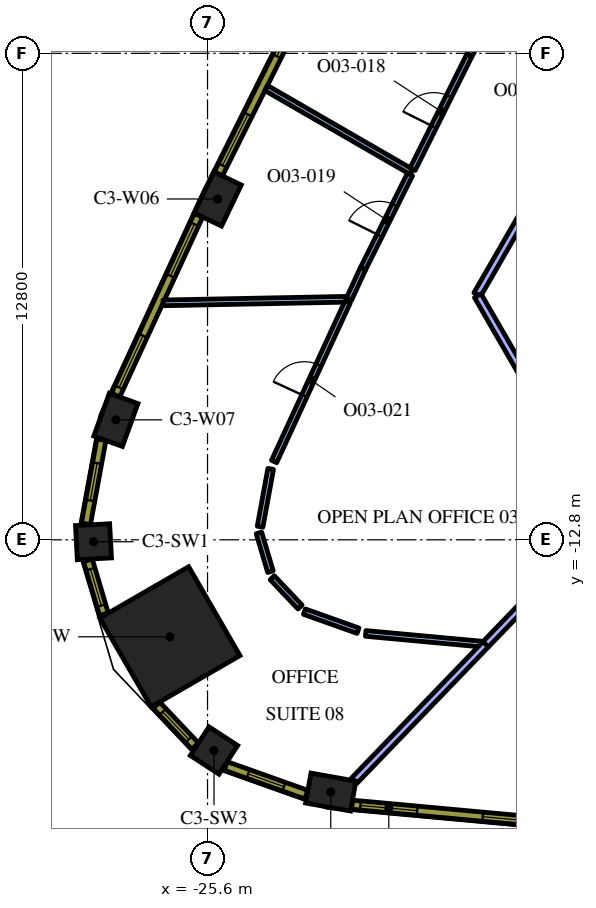
"""IFC4 building model, lengths in metres.
Left out: names, types, materials, properties, quantities, classifications, styles, units other than length and angle.
Written with IfcOpenShell. Run it as: python <this file> out.ifc"""

import sys

from ifc_helpers import new_model, si_unit, direction, frame, frame_2d, origin, origin_2d, place, context, subcontext, project, spatial, rectangle, extrude, element, fill, save


model = new_model("IFC4")
c1 = context("Model", 3, precision=1e-05, world=origin(), true_north=direction((0.0, 1.0)))
c2 = subcontext(c1, "Body", "Model", "MODEL_VIEW")
j1 = project(units=[si_unit("LENGTHUNIT", "METRE"), si_unit("PLANEANGLEUNIT", "RADIAN")], contexts=[c1])
p1 = place(None, origin())
s1 = spatial("IfcSite", under=j1, at=p1, CompositionType="ELEMENT")
p2 = place(p1, origin())
s2 = spatial("IfcBuilding", under=s1, at=p2, CompositionType="ELEMENT")
p3 = place(p2, frame((0.0, 0.0, 175.2)))
s3 = spatial("IfcBuildingStorey", under=s2, at=p3, CompositionType="ELEMENT", Elevation=175.2)
p4 = place(p3, frame((-26.591, -15.352, 0.0), z_axis=(0.0, 0.0, 1.0), x_axis=(-0.866025403784, -0.5, 0.0)))
e1 = element("IfcColumn", 1, at=p4, inside=s3, PredefinedType="COLUMN", context=c2, shape_type="SweptSolid", body=[
    extrude(rectangle(XDim=2.7, YDim=2.7, at=origin_2d()), origin(), (0.0, 0.0, 1.0), 4.2),
])
for number, where, z_axis, x_axis in (
    (2, (-22.357, -19.437, 0.0), (0.0, 0.0, 1.0), (0.985, -0.175, 0.0)),
    (3, (-25.332, -3.832, 0.0), (0.0, 0.0, 1.0), (-0.433, -0.902, 0.0)),
    (4, (-28.012, -9.644, 0.0), (0.0, 0.0, 1.0), (-0.341, -0.94, 0.0)),
):
    element("IfcColumn", number, at=place(p3, frame(where, z_axis=z_axis, x_axis=x_axis)), inside=s3, PredefinedType="COLUMN", context=c2, shape_type="SweptSolid", body=[
        extrude(rectangle(XDim=1.2, YDim=0.8, at=origin_2d()), origin(), (0.0, 0.0, 1.0), 4.2),
    ])
for number, where, z_axis, x_axis in (
    (5, (-28.601, -12.851, 0.0), (0.0, 0.0, 1.0), (0.053, -0.999, 0.0)),
    (6, (-25.43, -18.344, 0.0), (0.0, 0.0, 1.0), (0.838, -0.546, 0.0)),
):
    element("IfcColumn", number, at=place(p3, frame(where, z_axis=z_axis, x_axis=x_axis)), inside=s3, PredefinedType="COLUMN", context=c2, shape_type="SweptSolid", body=[
        extrude(rectangle(XDim=0.9, YDim=0.9, at=origin_2d()), origin(), (0.0, 0.0, 1.0), 4.2),
    ])
p5 = place(p3, frame((-18.288, -15.557, 0.0), z_axis=(0.0, 0.0, 1.0), x_axis=(0.693944823318, 0.720028181525, 0.0)))
e7 = element("IfcWall", 7, at=p5, inside=s3, PredefinedType="PARTITIONING", context=c2, shape_type="SweptSolid", body=[
    extrude(rectangle(XDim=4.596, YDim=0.2, at=frame_2d((2.298, 0.0))), origin(), (0.0, 0.0, 1.0), 3.15),
])
p6 = place(p3, frame((-21.742, -19.14, 0.0), z_axis=(0.0, 0.0, 1.0), x_axis=(0.693986944276, 0.719987584042, 0.0)))
e8 = element("IfcWall", 8, at=p6, inside=s3, PredefinedType="PARTITIONING", context=c2, shape_type="SweptSolid", body=[
    extrude(rectangle(XDim=4.986, YDim=0.2, at=frame_2d((2.493, 0.0))), origin(), (0.0, 0.0, 1.0), 3.15),
])
p7 = place(p3, frame((-20.238, -3.117, 0.0), z_axis=(0.0, 0.0, 1.0), x_axis=(-0.866026031126, 0.499998913411, 0.0)))
e9 = element("IfcWall", 9, at=p7, inside=s3, PredefinedType="PARTITIONING", context=c2, shape_type="SweptSolid", body=[
    extrude(rectangle(XDim=4.408, YDim=0.15, at=frame_2d((2.204, 0.0))), origin(), (0.0, 0.0, 1.0), 3.15),
])
p8 = place(p3, frame((-17.33, 2.515, 0.0), z_axis=(0.0, 0.0, 1.0), x_axis=(-0.473335958085, -0.880881984595, 0.0)))
e10 = element("IfcWall", 10, at=p8, inside=s3, PredefinedType="PARTITIONING", context=c2, shape_type="SweptSolid", body=[
    extrude(rectangle(XDim=2.917, YDim=0.15, at=frame_2d((1.458, 0.0))), origin(), (0.0, 0.0, 1.0), 3.15),
])
p9 = place(p3, frame((-20.204, -3.049, 0.0), z_axis=(0.0, 0.0, 1.0), x_axis=(0.446250363478, 0.894908159029, 0.0)))
e11 = element("IfcWall", 11, at=p9, inside=s3, PredefinedType="PARTITIONING", context=c2, shape_type="SweptSolid", body=[
    extrude(rectangle(XDim=3.347, YDim=0.15, at=frame_2d((1.673, 0.0))), origin(), (0.0, 0.0, 1.0), 3.15),
])
p10 = place(p9, frame((1.247, 0.0, 0.0)))
e12 = element("IfcOpeningElement", 12, at=p10, cuts=e11, PredefinedType="OPENING", context=c2, shape_type="SweptSolid", body=[
    extrude(rectangle(XDim=0.9, YDim=2.1, at=frame_2d((0.45, 1.05))), frame((0.0, 0.085, 0.0), z_axis=(0.0, -1.0, 0.0), x_axis=(1.0, 0.0, 0.0)), (0.0, 0.0, 1.0), 0.17),
])
p11 = place(p3, frame((-21.509, -5.666, 0.0), z_axis=(0.0, 0.0, 1.0), x_axis=(0.446192228952, 0.894937145739, 0.0)))
e13 = element("IfcWall", 13, at=p11, inside=s3, PredefinedType="PARTITIONING", context=c2, shape_type="SweptSolid", body=[
    extrude(rectangle(XDim=2.774, YDim=0.15, at=frame_2d((1.387, 0.0))), origin(), (0.0, 0.0, 1.0), 3.15),
])
p12 = place(p11, frame((0.973, 0.0, 0.0)))
e14 = element("IfcOpeningElement", 14, at=p12, cuts=e13, PredefinedType="OPENING", context=c2, shape_type="SweptSolid", body=[
    extrude(rectangle(XDim=0.9, YDim=2.1, at=frame_2d((0.45, 1.05))), frame((0.0, 0.085, 0.0), z_axis=(0.0, -1.0, 0.0), x_axis=(1.0, 0.0, 0.0)), (0.0, 0.0, 1.0), 0.17),
])
p13 = place(p3, frame((-21.509, -5.666, 0.0), z_axis=(0.0, 0.0, 1.0), x_axis=(-0.4188658149, -0.908048142506, 0.0)))
e15 = element("IfcWall", 15, at=p13, inside=s3, PredefinedType="PARTITIONING", context=c2, shape_type="SweptSolid", body=[
    extrude(rectangle(XDim=0.885, YDim=0.15, at=frame_2d((0.443, 0.0))), origin(), (0.0, 0.0, 1.0), 3.15),
])
p14 = place(p3, frame((-21.963, -6.472, 0.0), z_axis=(0.0, 0.0, 1.0), x_axis=(-0.999809788098, -0.019503528505, 0.0)))
e16 = element("IfcWall", 16, at=p14, inside=s3, PredefinedType="PARTITIONING", context=c2, shape_type="SweptSolid", body=[
    extrude(rectangle(XDim=4.807, YDim=0.15, at=frame_2d((2.403, 0.0))), origin(), (0.0, 0.0, 1.0), 3.15),
])
p15 = place(p3, frame((-18.412, -15.542, 0.0), z_axis=(0.0, 0.0, 1.0), x_axis=(-0.995812481052, 0.091419377496, 0.0)))
e17 = element("IfcWall", 17, at=p15, inside=s3, PredefinedType="PARTITIONING", context=c2, shape_type="SweptSolid", body=[
    extrude(rectangle(XDim=3.039, YDim=0.15, at=frame_2d((1.52, 0.0))), origin(), (0.0, 0.0, 1.0), 3.15),
])
p16 = place(p3, frame((-21.64, -15.192, 0.0), z_axis=(0.0, 0.0, 1.0), x_axis=(-0.942099140138, 0.335334475041, 0.0)))
e18 = element("IfcWall", 18, at=p16, inside=s3, PredefinedType="PARTITIONING", context=c2, shape_type="SweptSolid", body=[
    extrude(rectangle(XDim=1.498, YDim=0.15, at=frame_2d((0.749, 0.0))), origin(), (0.0, 0.0, 1.0), 3.15),
])
p17 = place(p3, frame((-23.165, -14.57, 0.0), z_axis=(0.0, 0.0, 1.0), x_axis=(-0.688049940621, 0.725663337375, 0.0)))
e19 = element("IfcWall", 19, at=p17, inside=s3, PredefinedType="PARTITIONING", context=c2, shape_type="SweptSolid", body=[
    extrude(rectangle(XDim=1.064, YDim=0.15, at=frame_2d((0.532, 0.0))), origin(), (0.0, 0.0, 1.0), 3.15),
])
p18 = place(p3, frame((-23.945, -13.638, 0.0), z_axis=(0.0, 0.0, 1.0), x_axis=(-0.284463225945, 0.9586869526, 0.0)))
e20 = element("IfcWall", 20, at=p18, inside=s3, PredefinedType="PARTITIONING", context=c2, shape_type="SweptSolid", body=[
    extrude(rectangle(XDim=1.064, YDim=0.15, at=frame_2d((0.532, 0.0))), origin(), (0.0, 0.0, 1.0), 3.15),
])
p19 = place(p3, frame((-24.217, -12.455, 0.0), z_axis=(0.0, 0.0, 1.0), x_axis=(0.180635934027, 0.983550028894, 0.0)))
e21 = element("IfcWall", 21, at=p19, inside=s3, PredefinedType="PARTITIONING", context=c2, shape_type="SweptSolid", body=[
    extrude(rectangle(XDim=1.546, YDim=0.15, at=frame_2d((0.773, 0.0))), origin(), (0.0, 0.0, 1.0), 3.15),
])
p20 = place(p3, frame((-23.848, -10.74, 0.0), z_axis=(0.0, 0.0, 1.0), x_axis=(0.418723219841, 0.908113905392, 0.0)))
e22 = element("IfcWall", 22, at=p20, inside=s3, PredefinedType="PARTITIONING", context=c2, shape_type="SweptSolid", body=[
    extrude(rectangle(XDim=4.623, YDim=0.15, at=frame_2d((2.311, 0.0))), origin(), (0.0, 0.0, 1.0), 3.15),
])
p21 = place(p20, frame((1.9, 0.0, 0.0)))
e23 = element("IfcOpeningElement", 23, at=p21, cuts=e22, PredefinedType="OPENING", context=c2, shape_type="SweptSolid", body=[
    extrude(rectangle(XDim=0.9, YDim=2.1, at=frame_2d((0.45, 1.05))), frame((0.0, 0.085, 0.0), z_axis=(0.0, -1.0, 0.0), x_axis=(1.0, 0.0, 0.0)), (0.0, 0.0, 1.0), 0.17),
])
p22 = place(p3, frame((-13.146, 2.931, 0.0), z_axis=(0.0, 0.0, 1.0), x_axis=(-0.499997861235, -0.866026638597, 0.0)))
e24 = element("IfcWall", 24, at=p22, inside=s3, PredefinedType="PARTITIONING", context=c2, shape_type="SweptSolid", body=[
    extrude(rectangle(XDim=10.717, YDim=0.2, at=frame_2d((5.359, 0.0))), origin(), (0.0, 0.0, 1.0), 3.15),
])
p23 = place(p22, frame((4.9, 0.0, 0.0)))
e25 = element("IfcOpeningElement", 25, at=p23, cuts=e24, PredefinedType="OPENING", context=c2, shape_type="SweptSolid", body=[
    extrude(rectangle(XDim=1.0, YDim=2.1, at=frame_2d((0.5, 1.05))), frame((0.0, 0.11, 0.0), z_axis=(0.0, -1.0, 0.0), x_axis=(1.0, 0.0, 0.0)), (0.0, 0.0, 1.0), 0.22),
])
p24 = place(p3, frame((-18.489, -6.376, 0.0), z_axis=(0.0, 0.0, 1.0), x_axis=(0.499989401968, -0.866031522475, 0.0)))
e26 = element("IfcWall", 26, at=p24, inside=s3, PredefinedType="PARTITIONING", context=c2, shape_type="SweptSolid", body=[
    extrude(rectangle(XDim=6.677, YDim=0.2, at=frame_2d((3.338, 0.0))), origin(), (0.0, 0.0, 1.0), 3.15),
])
p25 = place(p3, frame((-21.797, -19.77, 0.0), z_axis=(0.0, 0.0, 1.0), x_axis=(0.995808712151, -0.091460422067, 0.0)))
e27 = element("IfcWall", 27, at=p25, inside=s3, PredefinedType="SOLIDWALL", context=c2, shape_type="SweptSolid", body=[
    extrude(rectangle(XDim=5.213, YDim=0.24, at=frame_2d((2.606, 0.0))), origin(), (0.0, 0.0, 1.0), 3.95),
])
p26 = place(p25, frame((0.221, 0.0, 0.9)))
e28 = element("IfcOpeningElement", 28, at=p26, cuts=e27, PredefinedType="OPENING", context=c2, shape_type="SweptSolid", body=[
    extrude(rectangle(XDim=1.5, YDim=2.55, at=frame_2d((0.75, 1.275))), frame((0.0, 0.13, 0.0), z_axis=(0.0, -1.0, 0.0), x_axis=(1.0, 0.0, 0.0)), (0.0, 0.0, 1.0), 0.26),
])
p27 = place(p25, frame((3.452, 0.0, 0.9)))
e29 = element("IfcOpeningElement", 29, at=p27, cuts=e27, PredefinedType="OPENING", context=c2, shape_type="SweptSolid", body=[
    extrude(rectangle(XDim=1.5, YDim=2.55, at=frame_2d((0.75, 1.275))), frame((0.0, 0.13, 0.0), z_axis=(0.0, -1.0, 0.0), x_axis=(1.0, 0.0, 0.0)), (0.0, 0.0, 1.0), 0.26),
])
p28 = place(p3, frame((-22.994, 1.485, 0.0), z_axis=(0.0, 0.0, 1.0), x_axis=(-0.446256171312, -0.8949052629, 0.0)))
e30 = element("IfcWall", 30, at=p28, inside=s3, PredefinedType="SOLIDWALL", context=c2, shape_type="SweptSolid", body=[
    extrude(rectangle(XDim=5.203, YDim=0.24, at=frame_2d((2.602, 0.0))), origin(), (0.0, 0.0, 1.0), 3.95),
])
p29 = place(p28, frame((0.248, 0.0, 0.9)))
e31 = element("IfcOpeningElement", 31, at=p29, cuts=e30, PredefinedType="OPENING", context=c2, shape_type="SweptSolid", body=[
    extrude(rectangle(XDim=1.5, YDim=2.55, at=frame_2d((0.75, 1.275))), frame((0.0, 0.13, 0.0), z_axis=(0.0, -1.0, 0.0), x_axis=(1.0, 0.0, 0.0)), (0.0, 0.0, 1.0), 0.26),
])
p30 = place(p28, frame((3.455, 0.0, 0.9)))
e32 = element("IfcOpeningElement", 32, at=p30, cuts=e30, PredefinedType="OPENING", context=c2, shape_type="SweptSolid", body=[
    extrude(rectangle(XDim=1.5, YDim=2.55, at=frame_2d((0.75, 1.275))), frame((0.0, 0.13, 0.0), z_axis=(0.0, -1.0, 0.0), x_axis=(1.0, 0.0, 0.0)), (0.0, 0.0, 1.0), 0.26),
])
p31 = place(p3, frame((-25.837, -4.258, 0.0), z_axis=(0.0, 0.0, 1.0), x_axis=(-0.418722559465, -0.908114209885, 0.0)))
e33 = element("IfcWall", 33, at=p31, inside=s3, PredefinedType="SOLIDWALL", context=c2, shape_type="SweptSolid", body=[
    extrude(rectangle(XDim=5.213, YDim=0.24, at=frame_2d((2.606, 0.0))), origin(), (0.0, 0.0, 1.0), 3.95),
])
p32 = place(p31, frame((0.261, 0.0, 0.9)))
e34 = element("IfcOpeningElement", 34, at=p32, cuts=e33, PredefinedType="OPENING", context=c2, shape_type="SweptSolid", body=[
    extrude(rectangle(XDim=1.5, YDim=2.55, at=frame_2d((0.75, 1.275))), frame((0.0, 0.13, 0.0), z_axis=(0.0, -1.0, 0.0), x_axis=(1.0, 0.0, 0.0)), (0.0, 0.0, 1.0), 0.26),
])
p33 = place(p31, frame((3.492, 0.0, 0.9)))
e35 = element("IfcOpeningElement", 35, at=p33, cuts=e33, PredefinedType="OPENING", context=c2, shape_type="SweptSolid", body=[
    extrude(rectangle(XDim=1.5, YDim=2.55, at=frame_2d((0.75, 1.275))), frame((0.0, 0.13, 0.0), z_axis=(0.0, -1.0, 0.0), x_axis=(1.0, 0.0, 0.0)), (0.0, 0.0, 1.0), 0.26),
])
p34 = place(p3, frame((-28.393, -10.167, 0.0), z_axis=(0.0, 0.0, 1.0), x_axis=(-0.180737189259, -0.983531427265, 0.0)))
e36 = element("IfcWall", 36, at=p34, inside=s3, PredefinedType="SOLIDWALL", context=c2, shape_type="SweptSolid", body=[
    extrude(rectangle(XDim=2.25, YDim=0.24, at=frame_2d((1.125, 0.0))), origin(), (0.0, 0.0, 1.0), 3.95),
])
p35 = place(p34, frame((0.625, 0.0, 0.9)))
e37 = element("IfcOpeningElement", 37, at=p35, cuts=e36, PredefinedType="OPENING", context=c2, shape_type="SweptSolid", body=[
    extrude(rectangle(XDim=1.0, YDim=2.55, at=frame_2d((0.5, 1.275))), frame((0.0, 0.13, 0.0), z_axis=(0.0, -1.0, 0.0), x_axis=(1.0, 0.0, 0.0)), (0.0, 0.0, 1.0), 0.26),
])
p36 = place(p3, frame((-28.748, -13.34, 0.0), z_axis=(0.0, 0.0, 1.0), x_axis=(0.284413721403, -0.958701640281, 0.0)))
e38 = element("IfcWall", 38, at=p36, inside=s3, PredefinedType="SOLIDWALL", context=c2, shape_type="SweptSolid", body=[
    extrude(rectangle(XDim=1.482, YDim=0.24, at=frame_2d((0.741, 0.0))), origin(), (0.0, 0.0, 1.0), 3.95),
])
p37 = place(p36, frame((0.241, 0.0, 0.9)))
e39 = element("IfcOpeningElement", 39, at=p37, cuts=e38, PredefinedType="OPENING", context=c2, shape_type="SweptSolid", body=[
    extrude(rectangle(XDim=1.0, YDim=2.55, at=frame_2d((0.5, 1.275))), frame((0.0, 0.13, 0.0), z_axis=(0.0, -1.0, 0.0), x_axis=(1.0, 0.0, 0.0)), (0.0, 0.0, 1.0), 0.26),
])
p38 = place(p3, frame((-26.946, -17.151, 0.0), z_axis=(0.0, 0.0, 1.0), x_axis=(0.687986858937, -0.725723144133, 0.0)))
e40 = element("IfcWall", 40, at=p38, inside=s3, PredefinedType="SOLIDWALL", context=c2, shape_type="SweptSolid", body=[
    extrude(rectangle(XDim=1.481, YDim=0.24, at=frame_2d((0.741, 0.0))), origin(), (0.0, 0.0, 1.0), 3.95),
])
p39 = place(p38, frame((0.241, 0.0, 0.9)))
e41 = element("IfcOpeningElement", 41, at=p39, cuts=e40, PredefinedType="OPENING", context=c2, shape_type="SweptSolid", body=[
    extrude(rectangle(XDim=1.0, YDim=2.55, at=frame_2d((0.5, 1.275))), frame((0.0, 0.13, 0.0), z_axis=(0.0, -1.0, 0.0), x_axis=(1.0, 0.0, 0.0)), (0.0, 0.0, 1.0), 0.26),
])
p40 = place(p3, frame((-25.121, -18.751, 0.0), z_axis=(0.0, 0.0, 1.0), x_axis=(0.942099727267, -0.335332825539, 0.0)))
e42 = element("IfcWall", 42, at=p40, inside=s3, PredefinedType="SOLIDWALL", context=c2, shape_type="SweptSolid", body=[
    extrude(rectangle(XDim=2.25, YDim=0.24, at=frame_2d((1.125, 0.0))), origin(), (0.0, 0.0, 1.0), 3.95),
])
p41 = place(p40, frame((0.625, 0.0, 0.9)))
e43 = element("IfcOpeningElement", 43, at=p41, cuts=e42, PredefinedType="OPENING", context=c2, shape_type="SweptSolid", body=[
    extrude(rectangle(XDim=1.0, YDim=2.55, at=frame_2d((0.5, 1.275))), frame((0.0, 0.13, 0.0), z_axis=(0.0, -1.0, 0.0), x_axis=(1.0, 0.0, 0.0)), (0.0, 0.0, 1.0), 0.26),
])
p42 = place(p10, origin())
e44 = element("IfcDoor", 44, at=p42, inside=s3, OperationType="SINGLE_SWING_RIGHT", PredefinedType="DOOR", context=c2, shape_type="SweptSolid", body=[
    extrude(rectangle(XDim=0.9, YDim=2.1, at=frame_2d((0.45, 1.05))), frame((0.0, 0.025, 0.0), z_axis=(0.0, -1.0, 0.0), x_axis=(1.0, 0.0, 0.0)), (0.0, 0.0, 1.0), 0.05),
])
fill(e12, e44)
p43 = place(p12, origin())
e45 = element("IfcDoor", 45, at=p43, inside=s3, OperationType="SINGLE_SWING_RIGHT", PredefinedType="DOOR", context=c2, shape_type="SweptSolid", body=[
    extrude(rectangle(XDim=0.9, YDim=2.1, at=frame_2d((0.45, 1.05))), frame((0.0, 0.025, 0.0), z_axis=(0.0, -1.0, 0.0), x_axis=(1.0, 0.0, 0.0)), (0.0, 0.0, 1.0), 0.05),
])
fill(e14, e45)
p44 = place(p21, origin())
e46 = element("IfcDoor", 46, at=p44, inside=s3, OperationType="SINGLE_SWING_RIGHT", PredefinedType="DOOR", context=c2, shape_type="SweptSolid", body=[
    extrude(rectangle(XDim=0.9, YDim=2.1, at=frame_2d((0.45, 1.05))), frame((0.0, 0.025, 0.0), z_axis=(0.0, -1.0, 0.0), x_axis=(1.0, 0.0, 0.0)), (0.0, 0.0, 1.0), 0.05),
])
fill(e23, e46)
p45 = place(p26, origin())
e47 = element("IfcWindow", 47, at=p45, inside=s3, PartitioningType="SINGLE_PANEL", PredefinedType="WINDOW", context=c2, shape_type="SweptSolid", body=[
    extrude(rectangle(XDim=1.5, YDim=2.55, at=frame_2d((0.75, 1.275))), frame((0.0, 0.04, 0.0), z_axis=(0.0, -1.0, 0.0), x_axis=(1.0, 0.0, 0.0)), (0.0, 0.0, 1.0), 0.06),
])
fill(e28, e47)
p46 = place(p27, origin())
e48 = element("IfcWindow", 48, at=p46, inside=s3, PartitioningType="SINGLE_PANEL", PredefinedType="WINDOW", context=c2, shape_type="SweptSolid", body=[
    extrude(rectangle(XDim=1.5, YDim=2.55, at=frame_2d((0.75, 1.275))), frame((0.0, 0.04, 0.0), z_axis=(0.0, -1.0, 0.0), x_axis=(1.0, 0.0, 0.0)), (0.0, 0.0, 1.0), 0.06),
])
fill(e29, e48)
p47 = place(p29, origin())
e49 = element("IfcWindow", 49, at=p47, inside=s3, PartitioningType="SINGLE_PANEL", PredefinedType="WINDOW", context=c2, shape_type="SweptSolid", body=[
    extrude(rectangle(XDim=1.5, YDim=2.55, at=frame_2d((0.75, 1.275))), frame((0.0, 0.04, 0.0), z_axis=(0.0, -1.0, 0.0), x_axis=(1.0, 0.0, 0.0)), (0.0, 0.0, 1.0), 0.06),
])
fill(e31, e49)
p48 = place(p30, origin())
e50 = element("IfcWindow", 50, at=p48, inside=s3, PartitioningType="SINGLE_PANEL", PredefinedType="WINDOW", context=c2, shape_type="SweptSolid", body=[
    extrude(rectangle(XDim=1.5, YDim=2.55, at=frame_2d((0.75, 1.275))), frame((0.0, 0.04, 0.0), z_axis=(0.0, -1.0, 0.0), x_axis=(1.0, 0.0, 0.0)), (0.0, 0.0, 1.0), 0.06),
])
fill(e32, e50)
p49 = place(p32, origin())
e51 = element("IfcWindow", 51, at=p49, inside=s3, PartitioningType="SINGLE_PANEL", PredefinedType="WINDOW", context=c2, shape_type="SweptSolid", body=[
    extrude(rectangle(XDim=1.5, YDim=2.55, at=frame_2d((0.75, 1.275))), frame((0.0, 0.04, 0.0), z_axis=(0.0, -1.0, 0.0), x_axis=(1.0, 0.0, 0.0)), (0.0, 0.0, 1.0), 0.06),
])
fill(e34, e51)
p50 = place(p33, origin())
e52 = element("IfcWindow", 52, at=p50, inside=s3, PartitioningType="SINGLE_PANEL", PredefinedType="WINDOW", context=c2, shape_type="SweptSolid", body=[
    extrude(rectangle(XDim=1.5, YDim=2.55, at=frame_2d((0.75, 1.275))), frame((0.0, 0.04, 0.0), z_axis=(0.0, -1.0, 0.0), x_axis=(1.0, 0.0, 0.0)), (0.0, 0.0, 1.0), 0.06),
])
fill(e35, e52)
p51 = place(p35, origin())
e53 = element("IfcWindow", 53, at=p51, inside=s3, PartitioningType="SINGLE_PANEL", PredefinedType="WINDOW", context=c2, shape_type="SweptSolid", body=[
    extrude(rectangle(XDim=1.0, YDim=2.55, at=frame_2d((0.5, 1.275))), frame((0.0, 0.04, 0.0), z_axis=(0.0, -1.0, 0.0), x_axis=(1.0, 0.0, 0.0)), (0.0, 0.0, 1.0), 0.06),
])
fill(e37, e53)
p52 = place(p37, origin())
e54 = element("IfcWindow", 54, at=p52, inside=s3, PartitioningType="SINGLE_PANEL", PredefinedType="WINDOW", context=c2, shape_type="SweptSolid", body=[
    extrude(rectangle(XDim=1.0, YDim=2.55, at=frame_2d((0.5, 1.275))), frame((0.0, 0.04, 0.0), z_axis=(0.0, -1.0, 0.0), x_axis=(1.0, 0.0, 0.0)), (0.0, 0.0, 1.0), 0.06),
])
fill(e39, e54)
p53 = place(p39, origin())
e55 = element("IfcWindow", 55, at=p53, inside=s3, PartitioningType="SINGLE_PANEL", PredefinedType="WINDOW", context=c2, shape_type="SweptSolid", body=[
    extrude(rectangle(XDim=1.0, YDim=2.55, at=frame_2d((0.5, 1.275))), frame((0.0, 0.04, 0.0), z_axis=(0.0, -1.0, 0.0), x_axis=(1.0, 0.0, 0.0)), (0.0, 0.0, 1.0), 0.06),
])
fill(e41, e55)
p54 = place(p41, origin())
e56 = element("IfcWindow", 56, at=p54, inside=s3, PartitioningType="SINGLE_PANEL", PredefinedType="WINDOW", context=c2, shape_type="SweptSolid", body=[
    extrude(rectangle(XDim=1.0, YDim=2.55, at=frame_2d((0.5, 1.275))), frame((0.0, 0.04, 0.0), z_axis=(0.0, -1.0, 0.0), x_axis=(1.0, 0.0, 0.0)), (0.0, 0.0, 1.0), 0.06),
])
fill(e43, e56)
save(model, sys.argv[1])
